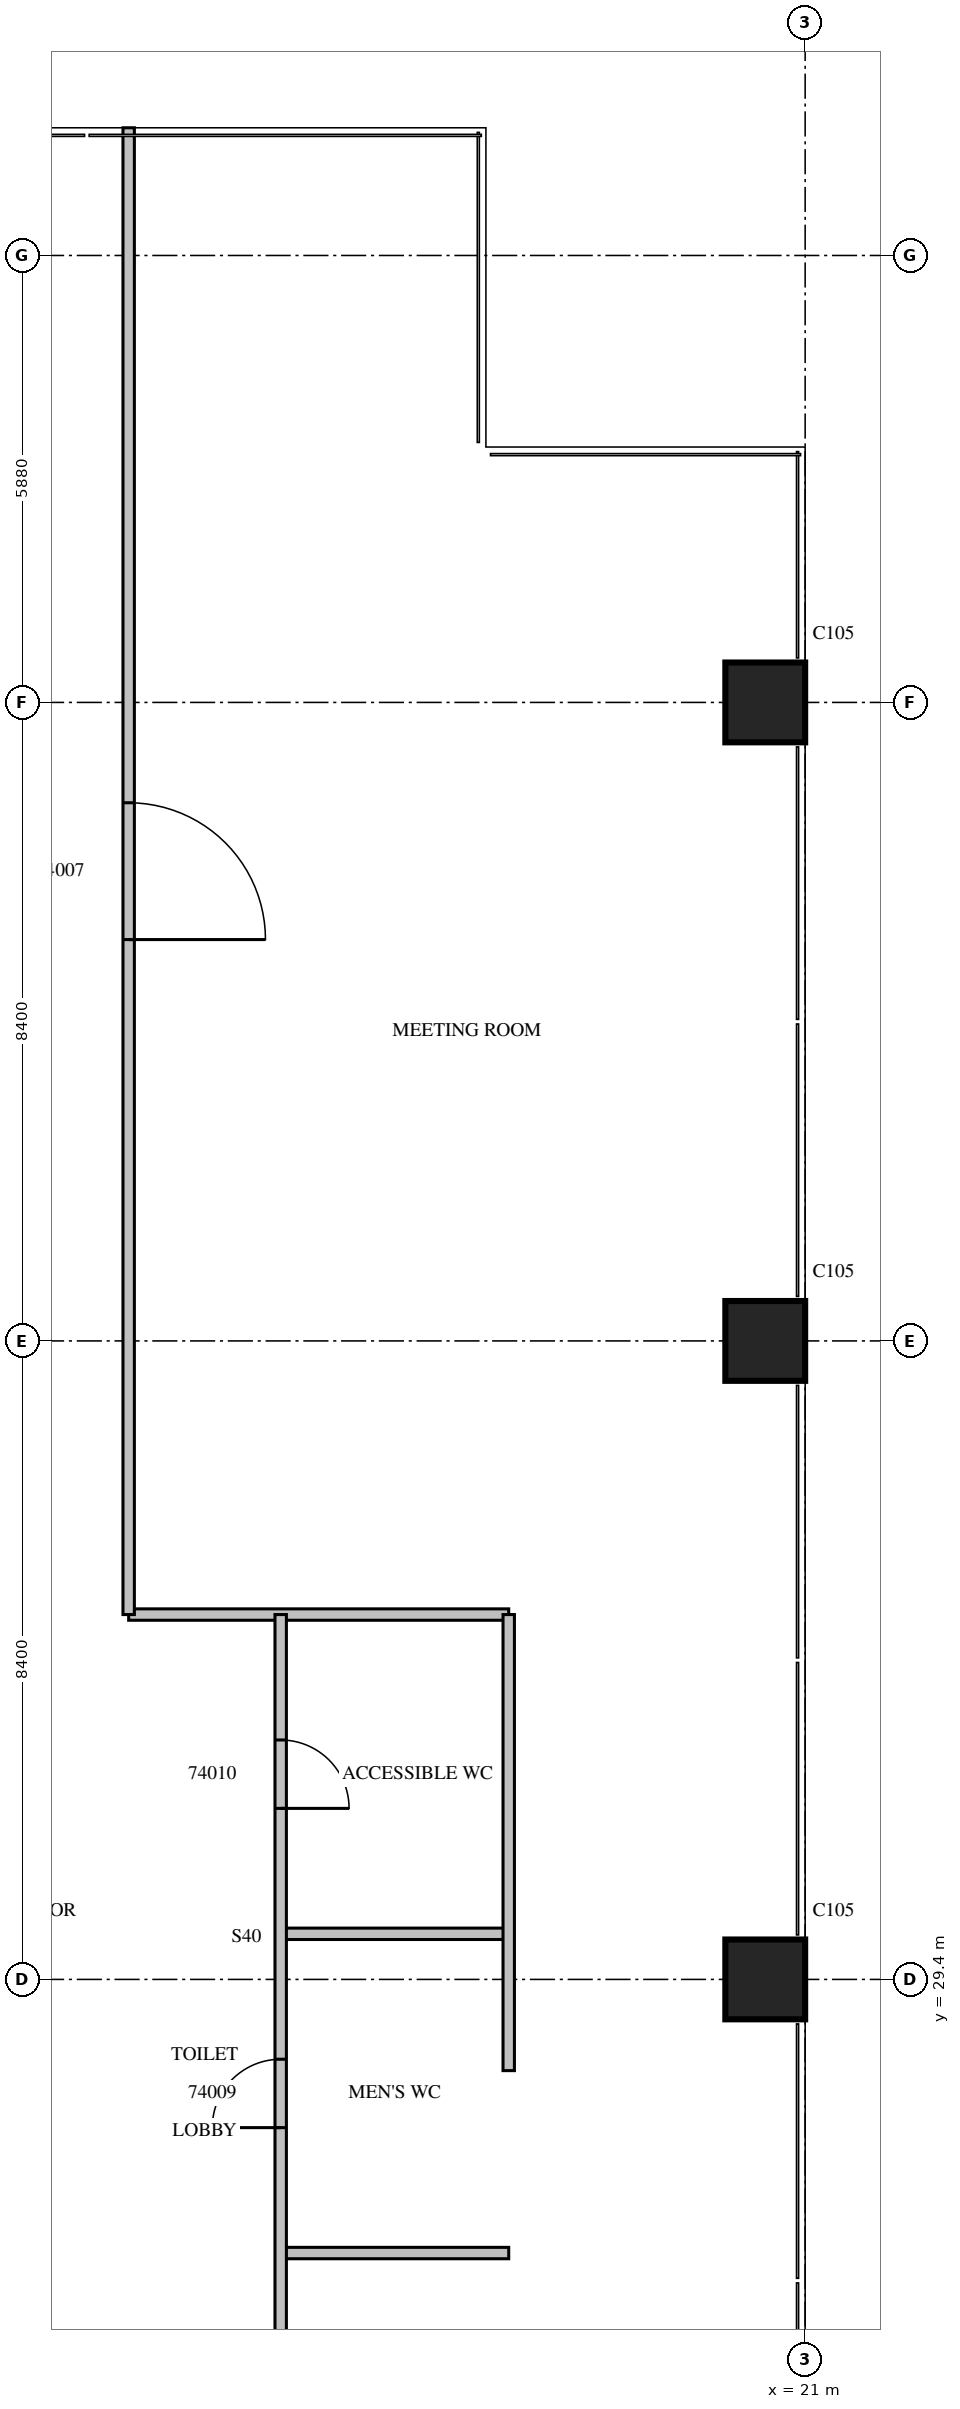
"""IFC4 building model, lengths in metres.
Left out: names, types, materials, properties, quantities, classifications, styles, units other than length and angle.
Written with IfcOpenShell. Run it as: python <this file> out.ifc"""

import sys

from ifc_helpers import new_model, si_unit, direction, frame, frame_2d, origin, origin_2d, place, context, subcontext, project, spatial, rectangle, extrude, source, transform, mapped, element, fill, save


model = new_model("IFC4")
c1 = context("Model", 3, precision=1e-05, world=origin(), true_north=direction((0.0, 1.0)))
c2 = subcontext(c1, "Body", "Model", "MODEL_VIEW")
j1 = project(units=[si_unit("LENGTHUNIT", "METRE"), si_unit("PLANEANGLEUNIT", "RADIAN")], contexts=[c1])
p1 = place(None, origin())
s1 = spatial("IfcSite", under=j1, at=p1, CompositionType="ELEMENT")
p2 = place(p1, origin())
s2 = spatial("IfcBuilding", under=s1, at=p2, CompositionType="ELEMENT")
p3 = place(p2, frame((0.0, 0.0, 170.3)))
s3 = spatial("IfcBuildingStorey", under=s2, at=p3, CompositionType="ELEMENT", Elevation=170.3)
m1 = source(origin(), c2, "Body", "SweptSolid", [
    extrude(rectangle(XDim=1.05, YDim=1.05, at=origin_2d()), origin(), (0.0, 0.0, 1.0), 7.5),
])
for number, where, z_axis, x_axis in (
    (1, (20.475, 29.4, 0.0), (0.0, 0.0, 1.0), (1.0, 0.0, 0.0)),
    (2, (20.475, 37.8, 0.0), (0.0, 0.0, 1.0), (1.0, 0.0, 0.0)),
    (3, (20.475, 46.2, 0.0), (0.0, 0.0, 1.0), (1.0, 0.0, 0.0)),
):
    element("IfcColumn", number, at=place(p3, frame(where, z_axis=z_axis, x_axis=x_axis)), inside=s3, PredefinedType="COLUMN", context=c2, shape_type="MappedRepresentation", body=[
        mapped(m1, transform((0.0, 0.0, 0.0), scale=1.0)),
    ])
p4 = place(p3, frame((14.1, 25.8, 0.0), z_axis=(0.0, 0.0, 1.0), x_axis=(1.0, 0.0, 0.0)))
e4 = element("IfcWall", 4, at=p4, inside=s3, PredefinedType="PARTITIONING", context=c2, shape_type="SweptSolid", body=[
    extrude(rectangle(XDim=3.0, YDim=0.15, at=frame_2d((1.5, 0.0))), origin(), (0.0, 0.0, 1.0), 7.1),
])
m2 = source(origin(), c2, "Body", "SweptSolid", [
    extrude(rectangle(XDim=3.0, YDim=0.15, at=frame_2d((1.5, 0.0))), origin(), (0.0, 0.0, 1.0), 7.1),
])
p5 = place(p3, frame((14.1, 30.0, 0.0), z_axis=(0.0, 0.0, 1.0), x_axis=(1.0, 0.0, 0.0)))
e5 = element("IfcWall", 5, at=p5, inside=s3, PredefinedType="PARTITIONING", context=c2, shape_type="MappedRepresentation", body=[
    mapped(m2, transform((0.0, 0.0, 0.0), scale=1.0)),
])
p6 = place(p3, frame((12.1, 34.2, 0.0), z_axis=(0.0, 0.0, 1.0), x_axis=(1.0, 0.0, 0.0)))
e6 = element("IfcWall", 6, at=p6, inside=s3, PredefinedType="PARTITIONING", context=c2, shape_type="SweptSolid", body=[
    extrude(rectangle(XDim=5.0, YDim=0.15, at=frame_2d((2.5, 0.0))), origin(), (0.0, 0.0, 1.0), 7.1),
])
p7 = place(p3, frame((12.1, 34.2, 0.0), z_axis=(0.0, 0.0, 1.0), x_axis=(0.0, 1.0, 0.0)))
e7 = element("IfcWall", 7, at=p7, inside=s3, PredefinedType="PARTITIONING", context=c2, shape_type="SweptSolid", body=[
    extrude(rectangle(XDim=19.56, YDim=0.15, at=frame_2d((9.78, 0.0))), origin(), (0.0, 0.0, 1.0), 7.1),
])
m3 = source(origin(), c2, "Body", "SweptSolid", [
    extrude(rectangle(XDim=1.8, YDim=2.1, at=frame_2d((0.9, 1.05))), frame((0.0, 0.085, 0.0), z_axis=(0.0, -1.0, 0.0), x_axis=(1.0, 0.0, 0.0)), (0.0, 0.0, 1.0), 0.17),
])
p8 = place(p7, frame((8.88, 0.0, 0.0)))
e8 = element("IfcOpeningElement", 8, at=p8, cuts=e7, PredefinedType="OPENING", context=c2, shape_type="MappedRepresentation", body=[
    mapped(m3, transform((0.0, 0.0, 0.0), scale=1.0)),
])
p9 = place(p3, frame((14.1, 21.6, 0.0), z_axis=(0.0, 0.0, 1.0), x_axis=(0.0, 1.0, 0.0)))
e9 = element("IfcWall", 9, at=p9, inside=s3, PredefinedType="PARTITIONING", context=c2, shape_type="SweptSolid", body=[
    extrude(rectangle(XDim=12.6, YDim=0.15, at=frame_2d((6.3, 0.0))), origin(), (0.0, 0.0, 1.0), 7.1),
])
m4 = source(origin(), c2, "Body", "SweptSolid", [
    extrude(rectangle(XDim=0.9, YDim=2.1, at=frame_2d((0.45, 1.05))), frame((0.0, 0.085, 0.0), z_axis=(0.0, -1.0, 0.0), x_axis=(1.0, 0.0, 0.0)), (0.0, 0.0, 1.0), 0.17),
])
p10 = place(p9, frame((1.65, 0.0, 0.0)))
e10 = element("IfcOpeningElement", 10, at=p10, cuts=e9, PredefinedType="OPENING", context=c2, shape_type="MappedRepresentation", body=[
    mapped(m4, transform((0.0, 0.0, 0.0), scale=1.0)),
])
p11 = place(p9, frame((5.85, 0.0, 0.0)))
e11 = element("IfcOpeningElement", 11, at=p11, cuts=e9, PredefinedType="OPENING", context=c2, shape_type="MappedRepresentation", body=[
    mapped(m4, transform((0.0, 0.0, 0.0), scale=1.0)),
])
p12 = place(p9, frame((10.05, 0.0, 0.0)))
e12 = element("IfcOpeningElement", 12, at=p12, cuts=e9, PredefinedType="OPENING", context=c2, shape_type="MappedRepresentation", body=[
    mapped(m4, transform((0.0, 0.0, 0.0), scale=1.0)),
])
p13 = place(p3, frame((17.1, 28.2, 0.0), z_axis=(0.0, 0.0, 1.0), x_axis=(0.0, 1.0, 0.0)))
e13 = element("IfcWall", 13, at=p13, inside=s3, PredefinedType="PARTITIONING", context=c2, shape_type="SweptSolid", body=[
    extrude(rectangle(XDim=6.0, YDim=0.15, at=frame_2d((3.0, 0.0))), origin(), (0.0, 0.0, 1.0), 7.1),
])
m5 = source(origin(), c2, "Body", "SweptSolid", [
    extrude(rectangle(XDim=1.8, YDim=2.1, at=frame_2d((0.9, 1.05))), frame((0.0, 0.025, 0.0), z_axis=(0.0, -1.0, 0.0), x_axis=(1.0, 0.0, 0.0)), (0.0, 0.0, 1.0), 0.05),
])
p14 = place(p8, origin())
e14 = element("IfcDoor", 14, at=p14, inside=s3, OperationType="DOUBLE_DOOR_SINGLE_SWING", PredefinedType="DOOR", context=c2, shape_type="MappedRepresentation", body=[
    mapped(m5, transform((0.0, 0.0, 0.0), scale=1.0)),
])
fill(e8, e14)
m6 = source(origin(), c2, "Body", "SweptSolid", [
    extrude(rectangle(XDim=0.9, YDim=2.1, at=frame_2d((0.45, 1.05))), frame((0.0, 0.025, 0.0), z_axis=(0.0, -1.0, 0.0), x_axis=(1.0, 0.0, 0.0)), (0.0, 0.0, 1.0), 0.05),
])
p15 = place(p11, origin())
e15 = element("IfcDoor", 15, at=p15, inside=s3, OperationType="SINGLE_SWING_LEFT", PredefinedType="DOOR", context=c2, shape_type="MappedRepresentation", body=[
    mapped(m6, transform((0.0, 0.0, 0.0), scale=1.0)),
])
fill(e11, e15)
p16 = place(p12, origin())
e16 = element("IfcDoor", 16, at=p16, inside=s3, OperationType="SINGLE_SWING_RIGHT", PredefinedType="DOOR", context=c2, shape_type="MappedRepresentation", body=[
    mapped(m6, transform((0.0, 0.0, 0.0), scale=1.0)),
])
fill(e12, e16)
save(model, sys.argv[1])
